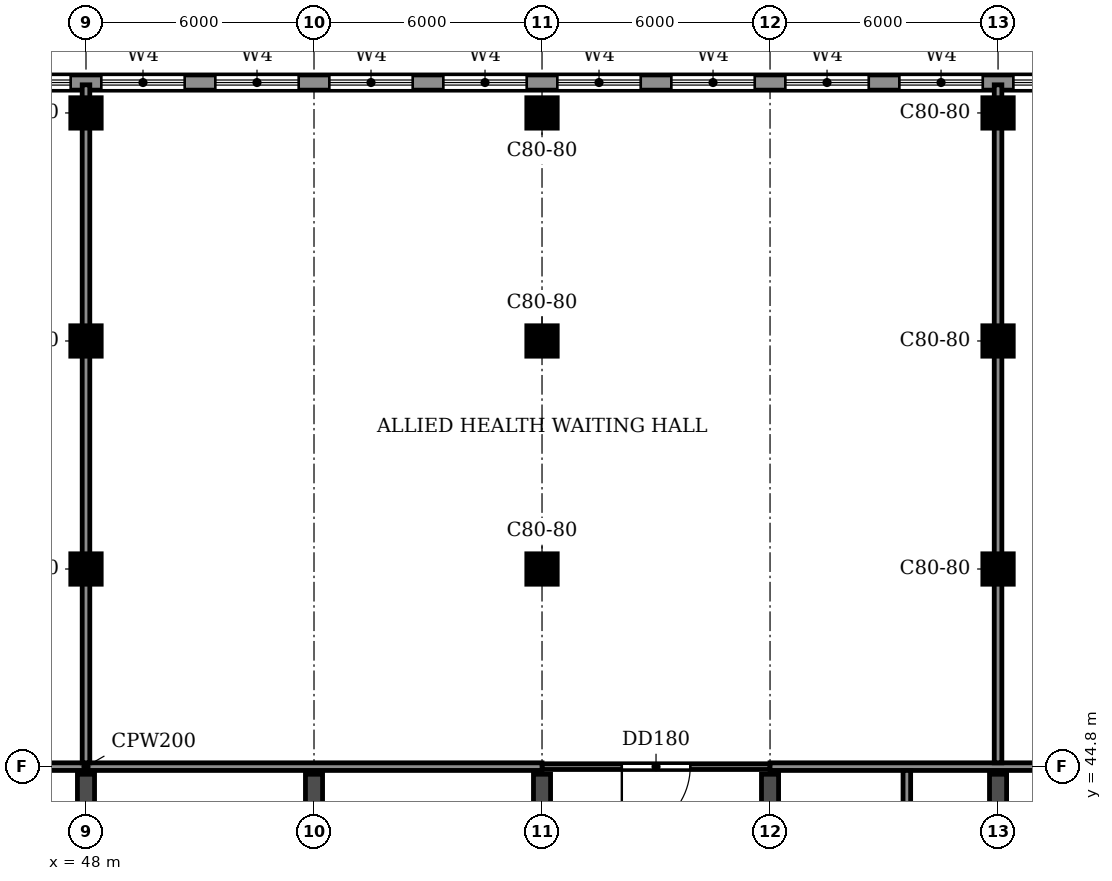
"""IFC4 building model, lengths in metres.
Left out: names, types, materials, properties, quantities, classifications, styles, units other than length and angle.
Written with IfcOpenShell. Run it as: python <this file> out.ifc"""

import sys

from ifc_helpers import new_model, si_unit, direction, frame, frame_2d, origin, origin_2d, place, context, subcontext, project, spatial, rectangle, extrude, source, transform, mapped, element, fill, save


model = new_model("IFC4")
c1 = context("Model", 3, precision=1e-05, world=origin(), true_north=direction((0.0, 1.0)))
c2 = subcontext(c1, "Body", "Model", "MODEL_VIEW")
j1 = project(units=[si_unit("LENGTHUNIT", "METRE"), si_unit("PLANEANGLEUNIT", "RADIAN")], contexts=[c1])
p1 = place(None, origin())
s1 = spatial("IfcSite", under=j1, at=p1, CompositionType="ELEMENT")
p2 = place(p1, origin())
s2 = spatial("IfcBuilding", under=s1, at=p2, CompositionType="ELEMENT")
p3 = place(p2, frame((0.0, 0.0, 10.8)))
s3 = spatial("IfcBuildingStorey", under=s2, at=p3, CompositionType="ELEMENT", Elevation=10.8)
for number, where, z_axis, x_axis in (
    (1, (48.0, 30.55, 0.0), (0.0, 0.0, 1.0), (0.0, 1.0, 0.0)),
    (2, (54.0, 30.55, 0.0), (0.0, 0.0, 1.0), (0.0, 1.0, 0.0)),
    (3, (60.0, 30.55, 0.0), (0.0, 0.0, 1.0), (0.0, 1.0, 0.0)),
    (4, (66.0, 30.55, 0.0), (0.0, 0.0, 1.0), (0.0, 1.0, 0.0)),
    (5, (72.0, 30.55, 0.0), (0.0, 0.0, 1.0), (0.0, 1.0, 0.0)),
):
    element("IfcWall", number, at=place(p3, frame(where, z_axis=z_axis, x_axis=x_axis)), inside=s3, PredefinedType="SHEAR", context=c2, shape_type="SweptSolid", body=[
        extrude(rectangle(XDim=14.05, YDim=0.45, at=frame_2d((7.025, 0.0))), origin(), (0.0, 0.0, 1.0), 3.92),
    ])
m1 = source(origin(), c2, "Body", "SweptSolid", [
    extrude(rectangle(XDim=0.8, YDim=0.8, at=origin_2d()), origin(), (0.0, 0.0, 1.0), 3.92),
])
for number, where, z_axis, x_axis in (
    (6, (48.0, 62.0, 0.0), (0.0, 0.0, 1.0), (1.0, 0.0, 0.0)),
    (7, (60.0, 62.0, 0.0), (0.0, 0.0, 1.0), (1.0, 0.0, 0.0)),
    (8, (72.0, 62.0, 0.0), (0.0, 0.0, 1.0), (1.0, 0.0, 0.0)),
    (9, (48.0, 56.0, 0.0), (0.0, 0.0, 1.0), (1.0, 0.0, 0.0)),
    (10, (60.0, 56.0, 0.0), (0.0, 0.0, 1.0), (1.0, 0.0, 0.0)),
    (11, (72.0, 56.0, 0.0), (0.0, 0.0, 1.0), (1.0, 0.0, 0.0)),
    (12, (48.0, 50.0, 0.0), (0.0, 0.0, 1.0), (1.0, 0.0, 0.0)),
    (13, (60.0, 50.0, 0.0), (0.0, 0.0, 1.0), (1.0, 0.0, 0.0)),
    (14, (72.0, 50.0, 0.0), (0.0, 0.0, 1.0), (1.0, 0.0, 0.0)),
):
    element("IfcColumn", number, at=place(p3, frame(where, z_axis=z_axis, x_axis=x_axis)), inside=s3, PredefinedType="COLUMN", context=c2, shape_type="MappedRepresentation", body=[
        mapped(m1, transform((0.0, 0.0, 0.0))),
    ])
p4 = place(p3, frame((105.0, 62.8, 0.0), z_axis=(0.0, 0.0, 1.0), x_axis=(-1.0, 0.0, 0.0)))
e15 = element("IfcWall", 15, at=p4, inside=s3, PredefinedType="STANDARD", context=c2, shape_type="SweptSolid", body=[
    extrude(rectangle(XDim=108.0, YDim=0.4, at=frame_2d((54.0, 0.0))), origin(), (0.0, 0.0, 1.0), 3.92),
])
p5 = place(p4, frame((102.4, 0.0, 0.9)))
e16 = element("IfcOpeningElement", 16, at=p5, cuts=e15, PredefinedType="OPENING", context=c2, shape_type="SweptSolid", body=[
    extrude(rectangle(XDim=2.2, YDim=2.7, at=frame_2d((1.1, 1.35))), frame((0.0, 0.21, 0.0), z_axis=(0.0, -1.0, 0.0), x_axis=(1.0, 0.0, 0.0)), (0.0, 0.0, 1.0), 0.42),
])
p6 = place(p4, frame((99.4, 0.0, 0.9)))
e17 = element("IfcOpeningElement", 17, at=p6, cuts=e15, PredefinedType="OPENING", context=c2, shape_type="SweptSolid", body=[
    extrude(rectangle(XDim=2.2, YDim=2.7, at=frame_2d((1.1, 1.35))), frame((0.0, 0.21, 0.0), z_axis=(0.0, -1.0, 0.0), x_axis=(1.0, 0.0, 0.0)), (0.0, 0.0, 1.0), 0.42),
])
p7 = place(p4, frame((90.4, 0.0, 0.9)))
e18 = element("IfcOpeningElement", 18, at=p7, cuts=e15, PredefinedType="OPENING", context=c2, shape_type="SweptSolid", body=[
    extrude(rectangle(XDim=2.2, YDim=2.7, at=frame_2d((1.1, 1.35))), frame((0.0, 0.21, 0.0), z_axis=(0.0, -1.0, 0.0), x_axis=(1.0, 0.0, 0.0)), (0.0, 0.0, 1.0), 0.42),
])
p8 = place(p4, frame((87.4, 0.0, 0.9)))
e19 = element("IfcOpeningElement", 19, at=p8, cuts=e15, PredefinedType="OPENING", context=c2, shape_type="SweptSolid", body=[
    extrude(rectangle(XDim=2.2, YDim=2.7, at=frame_2d((1.1, 1.35))), frame((0.0, 0.21, 0.0), z_axis=(0.0, -1.0, 0.0), x_axis=(1.0, 0.0, 0.0)), (0.0, 0.0, 1.0), 0.42),
])
p9 = place(p4, frame((84.4, 0.0, 0.9)))
e20 = element("IfcOpeningElement", 20, at=p9, cuts=e15, PredefinedType="OPENING", context=c2, shape_type="SweptSolid", body=[
    extrude(rectangle(XDim=2.2, YDim=2.7, at=frame_2d((1.1, 1.35))), frame((0.0, 0.21, 0.0), z_axis=(0.0, -1.0, 0.0), x_axis=(1.0, 0.0, 0.0)), (0.0, 0.0, 1.0), 0.42),
])
p10 = place(p4, frame((81.4, 0.0, 0.9)))
e21 = element("IfcOpeningElement", 21, at=p10, cuts=e15, PredefinedType="OPENING", context=c2, shape_type="SweptSolid", body=[
    extrude(rectangle(XDim=2.2, YDim=2.7, at=frame_2d((1.1, 1.35))), frame((0.0, 0.21, 0.0), z_axis=(0.0, -1.0, 0.0), x_axis=(1.0, 0.0, 0.0)), (0.0, 0.0, 1.0), 0.42),
])
p11 = place(p4, frame((78.4, 0.0, 0.9)))
e22 = element("IfcOpeningElement", 22, at=p11, cuts=e15, PredefinedType="OPENING", context=c2, shape_type="SweptSolid", body=[
    extrude(rectangle(XDim=2.2, YDim=2.7, at=frame_2d((1.1, 1.35))), frame((0.0, 0.21, 0.0), z_axis=(0.0, -1.0, 0.0), x_axis=(1.0, 0.0, 0.0)), (0.0, 0.0, 1.0), 0.42),
])
p12 = place(p4, frame((75.4, 0.0, 0.9)))
e23 = element("IfcOpeningElement", 23, at=p12, cuts=e15, PredefinedType="OPENING", context=c2, shape_type="SweptSolid", body=[
    extrude(rectangle(XDim=2.2, YDim=2.7, at=frame_2d((1.1, 1.35))), frame((0.0, 0.21, 0.0), z_axis=(0.0, -1.0, 0.0), x_axis=(1.0, 0.0, 0.0)), (0.0, 0.0, 1.0), 0.42),
])
p13 = place(p4, frame((66.4, 0.0, 0.9)))
e24 = element("IfcOpeningElement", 24, at=p13, cuts=e15, PredefinedType="OPENING", context=c2, shape_type="SweptSolid", body=[
    extrude(rectangle(XDim=2.2, YDim=2.7, at=frame_2d((1.1, 1.35))), frame((0.0, 0.21, 0.0), z_axis=(0.0, -1.0, 0.0), x_axis=(1.0, 0.0, 0.0)), (0.0, 0.0, 1.0), 0.42),
])
p14 = place(p4, frame((63.4, 0.0, 0.9)))
e25 = element("IfcOpeningElement", 25, at=p14, cuts=e15, PredefinedType="OPENING", context=c2, shape_type="SweptSolid", body=[
    extrude(rectangle(XDim=2.2, YDim=2.7, at=frame_2d((1.1, 1.35))), frame((0.0, 0.21, 0.0), z_axis=(0.0, -1.0, 0.0), x_axis=(1.0, 0.0, 0.0)), (0.0, 0.0, 1.0), 0.42),
])
p15 = place(p4, frame((60.4, 0.0, 0.9)))
e26 = element("IfcOpeningElement", 26, at=p15, cuts=e15, PredefinedType="OPENING", context=c2, shape_type="SweptSolid", body=[
    extrude(rectangle(XDim=2.2, YDim=2.7, at=frame_2d((1.1, 1.35))), frame((0.0, 0.21, 0.0), z_axis=(0.0, -1.0, 0.0), x_axis=(1.0, 0.0, 0.0)), (0.0, 0.0, 1.0), 0.42),
])
p16 = place(p4, frame((57.4, 0.0, 0.9)))
e27 = element("IfcOpeningElement", 27, at=p16, cuts=e15, PredefinedType="OPENING", context=c2, shape_type="SweptSolid", body=[
    extrude(rectangle(XDim=2.2, YDim=2.7, at=frame_2d((1.1, 1.35))), frame((0.0, 0.21, 0.0), z_axis=(0.0, -1.0, 0.0), x_axis=(1.0, 0.0, 0.0)), (0.0, 0.0, 1.0), 0.42),
])
p17 = place(p4, frame((54.4, 0.0, 0.9)))
e28 = element("IfcOpeningElement", 28, at=p17, cuts=e15, PredefinedType="OPENING", context=c2, shape_type="SweptSolid", body=[
    extrude(rectangle(XDim=2.2, YDim=2.7, at=frame_2d((1.1, 1.35))), frame((0.0, 0.21, 0.0), z_axis=(0.0, -1.0, 0.0), x_axis=(1.0, 0.0, 0.0)), (0.0, 0.0, 1.0), 0.42),
])
p18 = place(p4, frame((51.4, 0.0, 0.9)))
e29 = element("IfcOpeningElement", 29, at=p18, cuts=e15, PredefinedType="OPENING", context=c2, shape_type="SweptSolid", body=[
    extrude(rectangle(XDim=2.2, YDim=2.7, at=frame_2d((1.1, 1.35))), frame((0.0, 0.21, 0.0), z_axis=(0.0, -1.0, 0.0), x_axis=(1.0, 0.0, 0.0)), (0.0, 0.0, 1.0), 0.42),
])
p19 = place(p4, frame((48.4, 0.0, 0.9)))
e30 = element("IfcOpeningElement", 30, at=p19, cuts=e15, PredefinedType="OPENING", context=c2, shape_type="SweptSolid", body=[
    extrude(rectangle(XDim=2.2, YDim=2.7, at=frame_2d((1.1, 1.35))), frame((0.0, 0.21, 0.0), z_axis=(0.0, -1.0, 0.0), x_axis=(1.0, 0.0, 0.0)), (0.0, 0.0, 1.0), 0.42),
])
p20 = place(p4, frame((45.4, 0.0, 0.9)))
e31 = element("IfcOpeningElement", 31, at=p20, cuts=e15, PredefinedType="OPENING", context=c2, shape_type="SweptSolid", body=[
    extrude(rectangle(XDim=2.2, YDim=2.7, at=frame_2d((1.1, 1.35))), frame((0.0, 0.21, 0.0), z_axis=(0.0, -1.0, 0.0), x_axis=(1.0, 0.0, 0.0)), (0.0, 0.0, 1.0), 0.42),
])
p21 = place(p4, frame((42.4, 0.0, 0.9)))
e32 = element("IfcOpeningElement", 32, at=p21, cuts=e15, PredefinedType="OPENING", context=c2, shape_type="SweptSolid", body=[
    extrude(rectangle(XDim=2.2, YDim=2.7, at=frame_2d((1.1, 1.35))), frame((0.0, 0.21, 0.0), z_axis=(0.0, -1.0, 0.0), x_axis=(1.0, 0.0, 0.0)), (0.0, 0.0, 1.0), 0.42),
])
p22 = place(p4, frame((39.4, 0.0, 0.9)))
e33 = element("IfcOpeningElement", 33, at=p22, cuts=e15, PredefinedType="OPENING", context=c2, shape_type="SweptSolid", body=[
    extrude(rectangle(XDim=2.2, YDim=2.7, at=frame_2d((1.1, 1.35))), frame((0.0, 0.21, 0.0), z_axis=(0.0, -1.0, 0.0), x_axis=(1.0, 0.0, 0.0)), (0.0, 0.0, 1.0), 0.42),
])
p23 = place(p4, frame((36.4, 0.0, 0.9)))
e34 = element("IfcOpeningElement", 34, at=p23, cuts=e15, PredefinedType="OPENING", context=c2, shape_type="SweptSolid", body=[
    extrude(rectangle(XDim=2.2, YDim=2.7, at=frame_2d((1.1, 1.35))), frame((0.0, 0.21, 0.0), z_axis=(0.0, -1.0, 0.0), x_axis=(1.0, 0.0, 0.0)), (0.0, 0.0, 1.0), 0.42),
])
p24 = place(p4, frame((33.4, 0.0, 0.9)))
e35 = element("IfcOpeningElement", 35, at=p24, cuts=e15, PredefinedType="OPENING", context=c2, shape_type="SweptSolid", body=[
    extrude(rectangle(XDim=2.2, YDim=2.7, at=frame_2d((1.1, 1.35))), frame((0.0, 0.21, 0.0), z_axis=(0.0, -1.0, 0.0), x_axis=(1.0, 0.0, 0.0)), (0.0, 0.0, 1.0), 0.42),
])
p25 = place(p4, frame((30.4, 0.0, 0.9)))
e36 = element("IfcOpeningElement", 36, at=p25, cuts=e15, PredefinedType="OPENING", context=c2, shape_type="SweptSolid", body=[
    extrude(rectangle(XDim=2.2, YDim=2.7, at=frame_2d((1.1, 1.35))), frame((0.0, 0.21, 0.0), z_axis=(0.0, -1.0, 0.0), x_axis=(1.0, 0.0, 0.0)), (0.0, 0.0, 1.0), 0.42),
])
p26 = place(p4, frame((27.4, 0.0, 0.9)))
e37 = element("IfcOpeningElement", 37, at=p26, cuts=e15, PredefinedType="OPENING", context=c2, shape_type="SweptSolid", body=[
    extrude(rectangle(XDim=2.2, YDim=2.7, at=frame_2d((1.1, 1.35))), frame((0.0, 0.21, 0.0), z_axis=(0.0, -1.0, 0.0), x_axis=(1.0, 0.0, 0.0)), (0.0, 0.0, 1.0), 0.42),
])
p27 = place(p4, frame((24.4, 0.0, 0.9)))
e38 = element("IfcOpeningElement", 38, at=p27, cuts=e15, PredefinedType="OPENING", context=c2, shape_type="SweptSolid", body=[
    extrude(rectangle(XDim=2.2, YDim=2.7, at=frame_2d((1.1, 1.35))), frame((0.0, 0.21, 0.0), z_axis=(0.0, -1.0, 0.0), x_axis=(1.0, 0.0, 0.0)), (0.0, 0.0, 1.0), 0.42),
])
p28 = place(p4, frame((21.4, 0.0, 0.9)))
e39 = element("IfcOpeningElement", 39, at=p28, cuts=e15, PredefinedType="OPENING", context=c2, shape_type="SweptSolid", body=[
    extrude(rectangle(XDim=2.2, YDim=2.7, at=frame_2d((1.1, 1.35))), frame((0.0, 0.21, 0.0), z_axis=(0.0, -1.0, 0.0), x_axis=(1.0, 0.0, 0.0)), (0.0, 0.0, 1.0), 0.42),
])
p29 = place(p4, frame((18.4, 0.0, 0.9)))
e40 = element("IfcOpeningElement", 40, at=p29, cuts=e15, PredefinedType="OPENING", context=c2, shape_type="SweptSolid", body=[
    extrude(rectangle(XDim=2.2, YDim=2.7, at=frame_2d((1.1, 1.35))), frame((0.0, 0.21, 0.0), z_axis=(0.0, -1.0, 0.0), x_axis=(1.0, 0.0, 0.0)), (0.0, 0.0, 1.0), 0.42),
])
p30 = place(p4, frame((15.4, 0.0, 0.9)))
e41 = element("IfcOpeningElement", 41, at=p30, cuts=e15, PredefinedType="OPENING", context=c2, shape_type="SweptSolid", body=[
    extrude(rectangle(XDim=2.2, YDim=2.7, at=frame_2d((1.1, 1.35))), frame((0.0, 0.21, 0.0), z_axis=(0.0, -1.0, 0.0), x_axis=(1.0, 0.0, 0.0)), (0.0, 0.0, 1.0), 0.42),
])
p31 = place(p4, frame((12.4, 0.0, 0.9)))
e42 = element("IfcOpeningElement", 42, at=p31, cuts=e15, PredefinedType="OPENING", context=c2, shape_type="SweptSolid", body=[
    extrude(rectangle(XDim=2.2, YDim=2.7, at=frame_2d((1.1, 1.35))), frame((0.0, 0.21, 0.0), z_axis=(0.0, -1.0, 0.0), x_axis=(1.0, 0.0, 0.0)), (0.0, 0.0, 1.0), 0.42),
])
p32 = place(p4, frame((9.4, 0.0, 0.9)))
e43 = element("IfcOpeningElement", 43, at=p32, cuts=e15, PredefinedType="OPENING", context=c2, shape_type="SweptSolid", body=[
    extrude(rectangle(XDim=2.2, YDim=2.7, at=frame_2d((1.1, 1.35))), frame((0.0, 0.21, 0.0), z_axis=(0.0, -1.0, 0.0), x_axis=(1.0, 0.0, 0.0)), (0.0, 0.0, 1.0), 0.42),
])
p33 = place(p4, frame((93.8, 0.0, 0.0)))
e44 = element("IfcOpeningElement", 44, at=p33, cuts=e15, PredefinedType="OPENING", context=c2, shape_type="SweptSolid", body=[
    extrude(rectangle(XDim=2.0, YDim=2.4, at=frame_2d((1.0, 1.2))), frame((0.0, 0.21, 0.0), z_axis=(0.0, -1.0, 0.0), x_axis=(1.0, 0.0, 0.0)), (0.0, 0.0, 1.0), 0.42),
])
p34 = place(p4, frame((71.63, 0.0, 0.0)))
e45 = element("IfcOpeningElement", 45, at=p34, cuts=e15, PredefinedType="OPENING", context=c2, shape_type="SweptSolid", body=[
    extrude(rectangle(XDim=2.0, YDim=2.4, at=frame_2d((1.0, 1.2))), frame((0.0, 0.21, 0.0), z_axis=(0.0, -1.0, 0.0), x_axis=(1.0, 0.0, 0.0)), (0.0, 0.0, 1.0), 0.42),
])
p35 = place(p3, frame((60.0, 44.8, 0.0), z_axis=(0.0, 0.0, 1.0), x_axis=(1.0, 0.0, 0.0)))
e46 = element("IfcWall", 46, at=p35, inside=s3, PredefinedType="PARTITIONING", context=c2, shape_type="SweptSolid", body=[
    extrude(rectangle(XDim=6.0, YDim=0.15, at=frame_2d((3.0, 0.0))), origin(), (0.0, 0.0, 1.0), 3.92),
])
p36 = place(p35, frame((2.1, 0.0, 0.0)))
e47 = element("IfcOpeningElement", 47, at=p36, cuts=e46, PredefinedType="OPENING", context=c2, shape_type="SweptSolid", body=[
    extrude(rectangle(XDim=1.8, YDim=2.1, at=frame_2d((0.9, 1.05))), frame((0.0, 0.085, 0.0), z_axis=(0.0, -1.0, 0.0), x_axis=(1.0, 0.0, 0.0)), (0.0, 0.0, 1.0), 0.17),
])
p37 = place(p3, frame((36.0, 44.8, 0.0), z_axis=(0.0, 0.0, 1.0), x_axis=(1.0, 0.0, 0.0)))
e48 = element("IfcWall", 48, at=p37, inside=s3, PredefinedType="PARTITIONING", context=c2, shape_type="SweptSolid", body=[
    extrude(rectangle(XDim=24.0, YDim=0.2, at=frame_2d((12.0, 0.0))), origin(), (0.0, 0.0, 1.0), 3.92),
])
p38 = place(p3, frame((66.0, 44.8, 0.0), z_axis=(0.0, 0.0, 1.0), x_axis=(1.0, 0.0, 0.0)))
e49 = element("IfcWall", 49, at=p38, inside=s3, PredefinedType="PARTITIONING", context=c2, shape_type="SweptSolid", body=[
    extrude(rectangle(XDim=18.0, YDim=0.2, at=frame_2d((9.0, 0.0))), origin(), (0.0, 0.0, 1.0), 3.92),
])
p39 = place(p3, frame((48.0, 44.9, 0.0), z_axis=(0.0, 0.0, 1.0), x_axis=(0.0, 1.0, 0.0)))
e50 = element("IfcWall", 50, at=p39, inside=s3, PredefinedType="PARTITIONING", context=c2, shape_type="SweptSolid", body=[
    extrude(rectangle(XDim=17.84, YDim=0.2, at=frame_2d((8.92, 0.0))), origin(), (0.0, 0.0, 1.0), 3.92),
])
p40 = place(p3, frame((69.6, 32.875, 0.0), z_axis=(0.0, 0.0, 1.0), x_axis=(0.0, 1.0, 0.0)))
e51 = element("IfcWall", 51, at=p40, inside=s3, PredefinedType="PARTITIONING", context=c2, shape_type="SweptSolid", body=[
    extrude(rectangle(XDim=11.825, YDim=0.2, at=frame_2d((5.913, 0.0))), origin(), (0.0, 0.0, 1.0), 3.92),
])
p41 = place(p3, frame((72.0, 44.9, 0.0), z_axis=(0.0, 0.0, 1.0), x_axis=(0.0, 1.0, 0.0)))
e52 = element("IfcWall", 52, at=p41, inside=s3, PredefinedType="PARTITIONING", context=c2, shape_type="SweptSolid", body=[
    extrude(rectangle(XDim=17.84, YDim=0.2, at=frame_2d((8.92, 0.0))), origin(), (0.0, 0.0, 1.0), 3.92),
])
p42 = place(p16, origin())
e53 = element("IfcWindow", 53, at=p42, inside=s3, PartitioningType="DOUBLE_PANEL_HORIZONTAL", PredefinedType="WINDOW", context=c2, shape_type="SweptSolid", body=[
    extrude(rectangle(XDim=2.2, YDim=2.7, at=frame_2d((1.1, 1.35))), frame((0.0, 0.03, 0.0), z_axis=(0.0, -1.0, 0.0), x_axis=(1.0, 0.0, 0.0)), (0.0, 0.0, 1.0), 0.06),
])
fill(e27, e53)
p43 = place(p17, origin())
e54 = element("IfcWindow", 54, at=p43, inside=s3, PartitioningType="DOUBLE_PANEL_HORIZONTAL", PredefinedType="WINDOW", context=c2, shape_type="SweptSolid", body=[
    extrude(rectangle(XDim=2.2, YDim=2.7, at=frame_2d((1.1, 1.35))), frame((0.0, 0.03, 0.0), z_axis=(0.0, -1.0, 0.0), x_axis=(1.0, 0.0, 0.0)), (0.0, 0.0, 1.0), 0.06),
])
fill(e28, e54)
p44 = place(p18, origin())
e55 = element("IfcWindow", 55, at=p44, inside=s3, PartitioningType="DOUBLE_PANEL_HORIZONTAL", PredefinedType="WINDOW", context=c2, shape_type="SweptSolid", body=[
    extrude(rectangle(XDim=2.2, YDim=2.7, at=frame_2d((1.1, 1.35))), frame((0.0, 0.03, 0.0), z_axis=(0.0, -1.0, 0.0), x_axis=(1.0, 0.0, 0.0)), (0.0, 0.0, 1.0), 0.06),
])
fill(e29, e55)
p45 = place(p19, origin())
e56 = element("IfcWindow", 56, at=p45, inside=s3, PartitioningType="DOUBLE_PANEL_HORIZONTAL", PredefinedType="WINDOW", context=c2, shape_type="SweptSolid", body=[
    extrude(rectangle(XDim=2.2, YDim=2.7, at=frame_2d((1.1, 1.35))), frame((0.0, 0.03, 0.0), z_axis=(0.0, -1.0, 0.0), x_axis=(1.0, 0.0, 0.0)), (0.0, 0.0, 1.0), 0.06),
])
fill(e30, e56)
p46 = place(p20, origin())
e57 = element("IfcWindow", 57, at=p46, inside=s3, PartitioningType="DOUBLE_PANEL_HORIZONTAL", PredefinedType="WINDOW", context=c2, shape_type="SweptSolid", body=[
    extrude(rectangle(XDim=2.2, YDim=2.7, at=frame_2d((1.1, 1.35))), frame((0.0, 0.03, 0.0), z_axis=(0.0, -1.0, 0.0), x_axis=(1.0, 0.0, 0.0)), (0.0, 0.0, 1.0), 0.06),
])
fill(e31, e57)
p47 = place(p21, origin())
e58 = element("IfcWindow", 58, at=p47, inside=s3, PartitioningType="DOUBLE_PANEL_HORIZONTAL", PredefinedType="WINDOW", context=c2, shape_type="SweptSolid", body=[
    extrude(rectangle(XDim=2.2, YDim=2.7, at=frame_2d((1.1, 1.35))), frame((0.0, 0.03, 0.0), z_axis=(0.0, -1.0, 0.0), x_axis=(1.0, 0.0, 0.0)), (0.0, 0.0, 1.0), 0.06),
])
fill(e32, e58)
p48 = place(p22, origin())
e59 = element("IfcWindow", 59, at=p48, inside=s3, PartitioningType="DOUBLE_PANEL_HORIZONTAL", PredefinedType="WINDOW", context=c2, shape_type="SweptSolid", body=[
    extrude(rectangle(XDim=2.2, YDim=2.7, at=frame_2d((1.1, 1.35))), frame((0.0, 0.03, 0.0), z_axis=(0.0, -1.0, 0.0), x_axis=(1.0, 0.0, 0.0)), (0.0, 0.0, 1.0), 0.06),
])
fill(e33, e59)
p49 = place(p23, origin())
e60 = element("IfcWindow", 60, at=p49, inside=s3, PartitioningType="DOUBLE_PANEL_HORIZONTAL", PredefinedType="WINDOW", context=c2, shape_type="SweptSolid", body=[
    extrude(rectangle(XDim=2.2, YDim=2.7, at=frame_2d((1.1, 1.35))), frame((0.0, 0.03, 0.0), z_axis=(0.0, -1.0, 0.0), x_axis=(1.0, 0.0, 0.0)), (0.0, 0.0, 1.0), 0.06),
])
fill(e34, e60)
p50 = place(p24, origin())
e61 = element("IfcWindow", 61, at=p50, inside=s3, PartitioningType="DOUBLE_PANEL_HORIZONTAL", PredefinedType="WINDOW", context=c2, shape_type="SweptSolid", body=[
    extrude(rectangle(XDim=2.2, YDim=2.7, at=frame_2d((1.1, 1.35))), frame((0.0, 0.03, 0.0), z_axis=(0.0, -1.0, 0.0), x_axis=(1.0, 0.0, 0.0)), (0.0, 0.0, 1.0), 0.06),
])
fill(e35, e61)
p51 = place(p25, origin())
e62 = element("IfcWindow", 62, at=p51, inside=s3, PartitioningType="DOUBLE_PANEL_HORIZONTAL", PredefinedType="WINDOW", context=c2, shape_type="SweptSolid", body=[
    extrude(rectangle(XDim=2.2, YDim=2.7, at=frame_2d((1.1, 1.35))), frame((0.0, 0.03, 0.0), z_axis=(0.0, -1.0, 0.0), x_axis=(1.0, 0.0, 0.0)), (0.0, 0.0, 1.0), 0.06),
])
fill(e36, e62)
p52 = place(p36, frame((1.8, 0.0, 0.0), z_axis=(0.0, 0.0, 1.0), x_axis=(-1.0, 0.0, 0.0)))
e63 = element("IfcDoor", 63, at=p52, inside=s3, OperationType="DOUBLE_DOOR_SINGLE_SWING", PredefinedType="DOOR", context=c2, shape_type="SweptSolid", body=[
    extrude(rectangle(XDim=1.8, YDim=2.1, at=frame_2d((0.9, 1.05))), frame((0.0, 0.025, 0.0), z_axis=(0.0, -1.0, 0.0), x_axis=(1.0, 0.0, 0.0)), (0.0, 0.0, 1.0), 0.05),
])
fill(e47, e63)
save(model, sys.argv[1])
